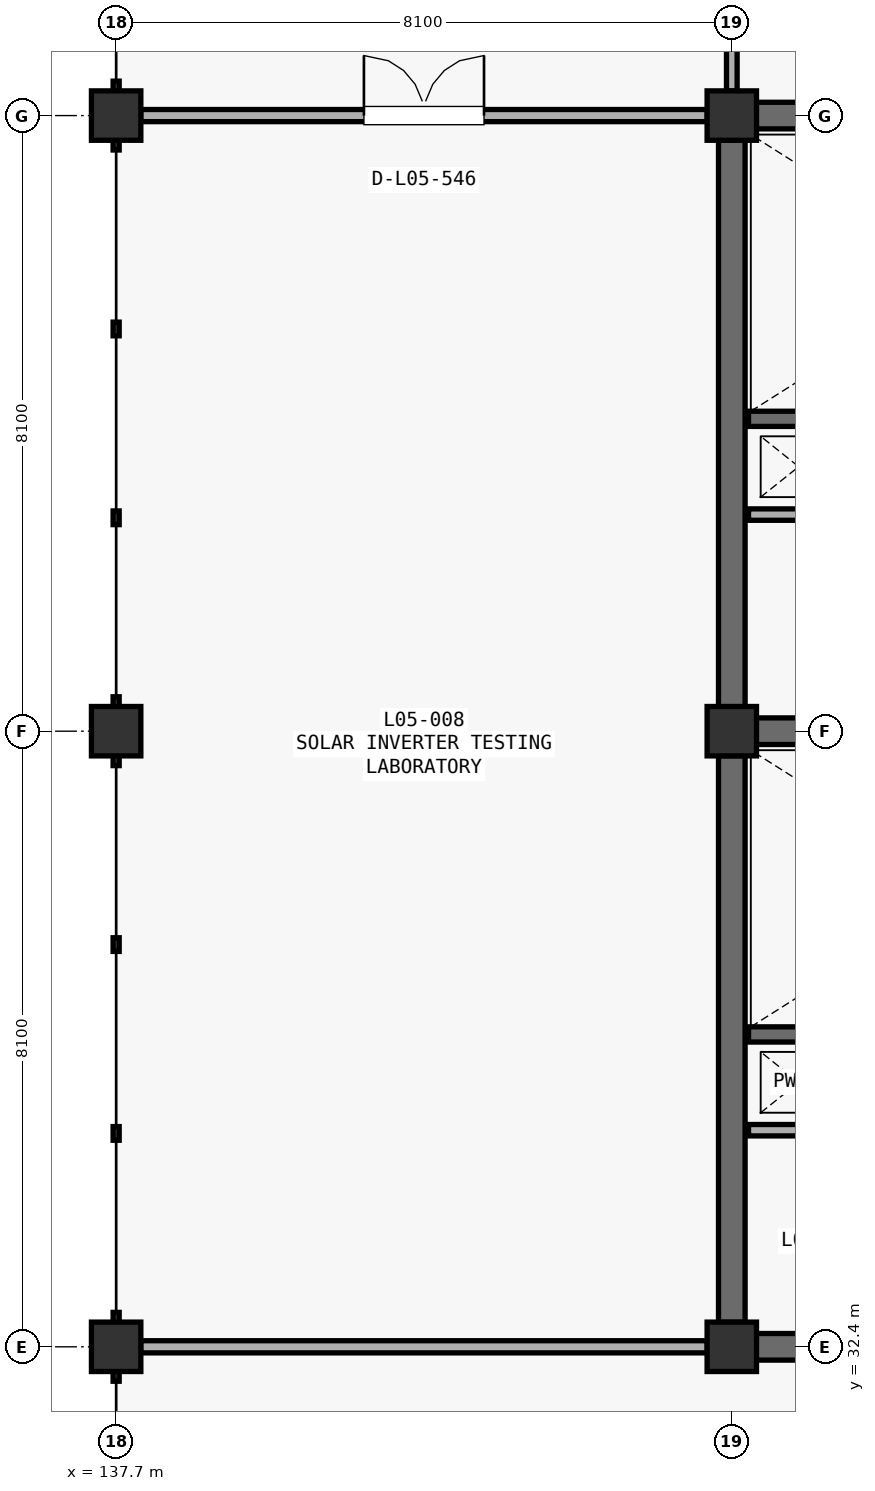
"""IFC4 building model, lengths in metres.
Left out: names, types, materials, properties, quantities, classifications, styles, units other than length and angle.
Written with IfcOpenShell. Run it as: python <this file> out.ifc"""

import sys

from ifc_helpers import new_model, si_unit, direction, frame, frame_2d, origin, origin_2d, place, context, subcontext, project, spatial, rectangle, extrude, element, fill, save


model = new_model("IFC4")
c1 = context("Model", 3, precision=1e-05, world=origin(), true_north=direction((0.0, 1.0)))
c2 = subcontext(c1, "Body", "Model", "MODEL_VIEW")
j1 = project(units=[si_unit("LENGTHUNIT", "METRE"), si_unit("PLANEANGLEUNIT", "RADIAN")], contexts=[c1])
p1 = place(None, origin())
s1 = spatial("IfcSite", under=j1, at=p1, CompositionType="ELEMENT")
p2 = place(p1, origin())
s2 = spatial("IfcBuilding", under=s1, at=p2, CompositionType="ELEMENT")
p3 = place(p2, frame((0.0, 0.0, 22.95)))
s3 = spatial("IfcBuildingStorey", under=s2, at=p3, CompositionType="ELEMENT", Elevation=22.95)
for number, where, z_axis, x_axis in (
    (1, (137.7, 32.4, 0.0), (0.0, 0.0, 1.0), (1.0, 0.0, 0.0)),
    (2, (137.7, 40.5, 0.0), (0.0, 0.0, 1.0), (1.0, 0.0, 0.0)),
    (3, (137.7, 48.6, 0.0), (0.0, 0.0, 1.0), (1.0, 0.0, 0.0)),
    (4, (145.8, 32.4, 0.0), (0.0, 0.0, 1.0), (1.0, 0.0, 0.0)),
    (5, (145.8, 40.5, 0.0), (0.0, 0.0, 1.0), (1.0, 0.0, 0.0)),
    (6, (145.8, 48.6, 0.0), (0.0, 0.0, 1.0), (1.0, 0.0, 0.0)),
):
    element("IfcColumn", number, at=place(p3, frame(where, z_axis=z_axis, x_axis=x_axis)), inside=s3, PredefinedType="COLUMN", context=c2, shape_type="SweptSolid", body=[
        extrude(rectangle(XDim=0.65, YDim=0.65, at=origin_2d()), origin(), (0.0, 0.0, 1.0), 4.42),
    ])
p4 = place(p3, frame((146.123, 40.5, 0.0), z_axis=(0.0, 0.0, 1.0), x_axis=(1.0, 0.0, 0.0)))
e7 = element("IfcWall", 7, at=p4, inside=s3, PredefinedType="SHEAR", context=c2, shape_type="SweptSolid", body=[
    extrude(rectangle(XDim=7.454, YDim=0.35, at=frame_2d((3.727, 0.0))), origin(), (0.0, 0.0, 1.0), 4.162),
])
p5 = place(p3, frame((145.8, 32.723, 0.0), z_axis=(0.0, 0.0, 1.0), x_axis=(0.0, 1.0, 0.0)))
e8 = element("IfcWall", 8, at=p5, inside=s3, PredefinedType="SHEAR", context=c2, shape_type="SweptSolid", body=[
    extrude(rectangle(XDim=7.454, YDim=0.35, at=frame_2d((3.727, 0.0))), origin(), (0.0, 0.0, 1.0), 4.162),
])
p6 = place(p3, frame((146.123, 32.4, 0.0), z_axis=(0.0, 0.0, 1.0), x_axis=(1.0, 0.0, 0.0)))
e9 = element("IfcWall", 9, at=p6, inside=s3, PredefinedType="SHEAR", context=c2, shape_type="SweptSolid", body=[
    extrude(rectangle(XDim=7.454, YDim=0.35, at=frame_2d((3.727, 0.0))), origin(), (0.0, 0.0, 1.0), 4.162),
])
p7 = place(p3, frame((146.02, 36.51, 0.0), z_axis=(0.0, 0.0, 1.0), x_axis=(1.0, 0.0, 0.0)))
e10 = element("IfcWall", 10, at=p7, inside=s3, PredefinedType="SHEAR", context=c2, shape_type="SweptSolid", body=[
    extrude(rectangle(XDim=7.66, YDim=0.2, at=frame_2d((3.83, 0.0))), origin(), (0.0, 0.0, 1.0), 4.162),
])
p8 = place(p7, frame((6.11, 0.0, 0.0)))
e11 = element("IfcOpeningElement", 11, at=p8, cuts=e10, PredefinedType="OPENING", context=c2, shape_type="SweptSolid", body=[
    extrude(rectangle(XDim=1.15, YDim=2.2, at=frame_2d((0.575, 1.1))), frame((0.0, 0.11, 0.0), z_axis=(0.0, -1.0, 0.0), x_axis=(1.0, 0.0, 0.0)), (0.0, 0.0, 1.0), 0.22),
])
p9 = place(p3, frame((146.02, 35.25, 0.0), z_axis=(0.0, 0.0, 1.0), x_axis=(1.0, 0.0, 0.0)))
e12 = element("IfcWall", 12, at=p9, inside=s3, PredefinedType="PARTITIONING", context=c2, shape_type="SweptSolid", body=[
    extrude(rectangle(XDim=2.53, YDim=0.15, at=frame_2d((1.265, 0.0))), origin(), (0.0, 0.0, 1.0), 4.162),
])
p10 = place(p3, frame((146.123, 48.6, 0.0), z_axis=(0.0, 0.0, 1.0), x_axis=(1.0, 0.0, 0.0)))
e13 = element("IfcWall", 13, at=p10, inside=s3, PredefinedType="SHEAR", context=c2, shape_type="SweptSolid", body=[
    extrude(rectangle(XDim=7.454, YDim=0.35, at=frame_2d((3.727, 0.0))), origin(), (0.0, 0.0, 1.0), 4.162),
])
p11 = place(p3, frame((145.8, 40.823, 0.0), z_axis=(0.0, 0.0, 1.0), x_axis=(0.0, 1.0, 0.0)))
e14 = element("IfcWall", 14, at=p11, inside=s3, PredefinedType="SHEAR", context=c2, shape_type="SweptSolid", body=[
    extrude(rectangle(XDim=7.454, YDim=0.35, at=frame_2d((3.727, 0.0))), origin(), (0.0, 0.0, 1.0), 4.162),
])
p12 = place(p3, frame((146.02, 44.61, 0.0), z_axis=(0.0, 0.0, 1.0), x_axis=(1.0, 0.0, 0.0)))
e15 = element("IfcWall", 15, at=p12, inside=s3, PredefinedType="SHEAR", context=c2, shape_type="SweptSolid", body=[
    extrude(rectangle(XDim=7.66, YDim=0.2, at=frame_2d((3.83, 0.0))), origin(), (0.0, 0.0, 1.0), 4.162),
])
p13 = place(p12, frame((6.11, 0.0, 0.0)))
e16 = element("IfcOpeningElement", 16, at=p13, cuts=e15, PredefinedType="OPENING", context=c2, shape_type="SweptSolid", body=[
    extrude(rectangle(XDim=1.15, YDim=2.2, at=frame_2d((0.575, 1.1))), frame((0.0, 0.11, 0.0), z_axis=(0.0, -1.0, 0.0), x_axis=(1.0, 0.0, 0.0)), (0.0, 0.0, 1.0), 0.22),
])
p14 = place(p3, frame((146.02, 43.35, 0.0), z_axis=(0.0, 0.0, 1.0), x_axis=(1.0, 0.0, 0.0)))
e17 = element("IfcWall", 17, at=p14, inside=s3, PredefinedType="PARTITIONING", context=c2, shape_type="SweptSolid", body=[
    extrude(rectangle(XDim=2.53, YDim=0.15, at=frame_2d((1.265, 0.0))), origin(), (0.0, 0.0, 1.0), 4.162),
])
p15 = place(p3, frame((145.8, 48.923, 0.0), z_axis=(0.0, 0.0, 1.0), x_axis=(0.0, 1.0, 0.0)))
e18 = element("IfcWall", 18, at=p15, inside=s3, PredefinedType="PARTITIONING", context=c2, shape_type="SweptSolid", body=[
    extrude(rectangle(XDim=7.454, YDim=0.14, at=frame_2d((3.727, 0.0))), origin(), (0.0, 0.0, 1.0), 3.31),
])
p16 = place(p3, frame((138.023, 32.4, 0.0), z_axis=(0.0, 0.0, 1.0), x_axis=(1.0, 0.0, 0.0)))
e19 = element("IfcWall", 19, at=p16, inside=s3, PredefinedType="PARTITIONING", context=c2, shape_type="SweptSolid", body=[
    extrude(rectangle(XDim=7.454, YDim=0.16, at=frame_2d((3.727, 0.0))), origin(), (0.0, 0.0, 1.0), 3.562),
])
p17 = place(p3, frame((138.023, 48.6, 0.0), z_axis=(0.0, 0.0, 1.0), x_axis=(1.0, 0.0, 0.0)))
e20 = element("IfcWall", 20, at=p17, inside=s3, PredefinedType="PARTITIONING", context=c2, shape_type="SweptSolid", body=[
    extrude(rectangle(XDim=7.454, YDim=0.16, at=frame_2d((3.727, 0.0))), origin(), (0.0, 0.0, 1.0), 3.212),
])
p18 = place(p17, frame((2.937, 0.0, 0.0)))
e21 = element("IfcOpeningElement", 21, at=p18, cuts=e20, PredefinedType="OPENING", context=c2, shape_type="SweptSolid", body=[
    extrude(rectangle(XDim=1.58, YDim=2.2, at=frame_2d((0.79, 1.1))), frame((0.0, 0.09, 0.0), z_axis=(0.0, -1.0, 0.0), x_axis=(1.0, 0.0, 0.0)), (0.0, 0.0, 1.0), 0.18),
])
p19 = place(p18, origin())
e22 = element("IfcDoor", 22, at=p19, inside=s3, OperationType="DOUBLE_SWING_LEFT", PredefinedType="DOOR", context=c2, shape_type="SweptSolid", body=[
    extrude(rectangle(XDim=1.58, YDim=2.2, at=frame_2d((0.79, 1.1))), frame((0.0, 0.025, 0.0), z_axis=(0.0, -1.0, 0.0), x_axis=(1.0, 0.0, 0.0)), (0.0, 0.0, 1.0), 0.05),
])
fill(e21, e22)
save(model, sys.argv[1])
